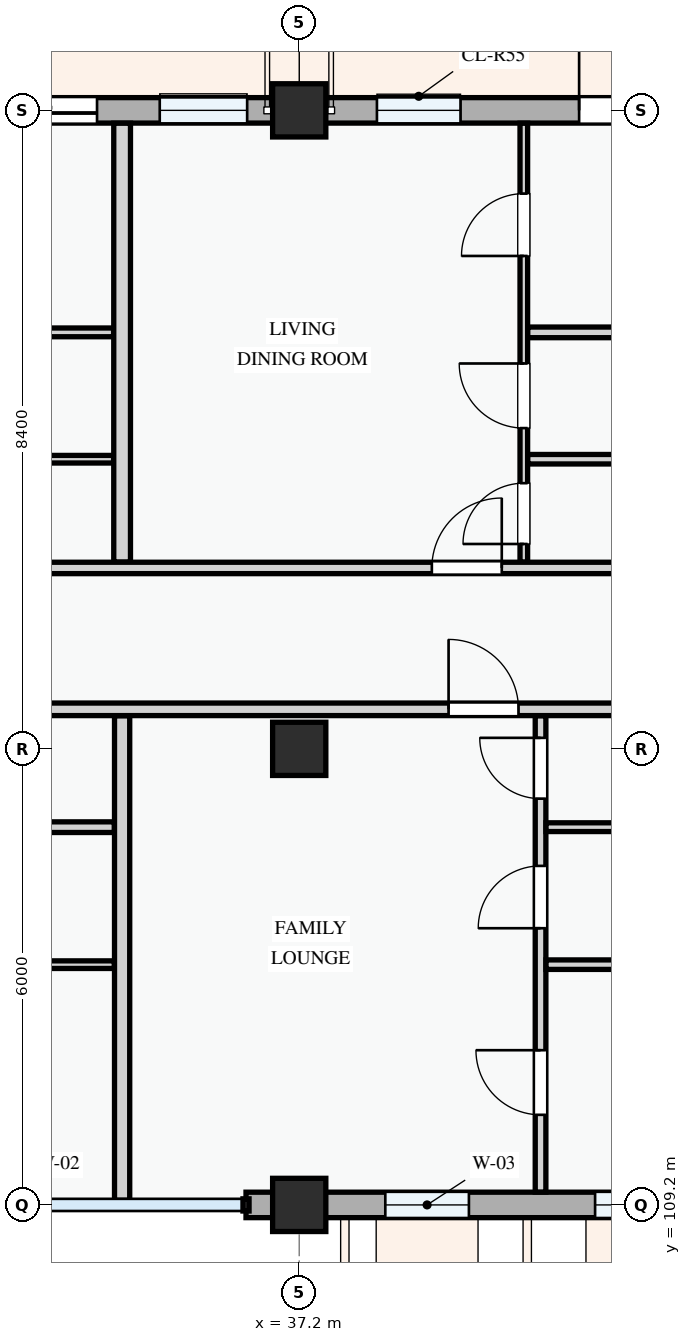
"""IFC4 building model, lengths in metres.
Left out: names, types, materials, properties, quantities, classifications, styles, units other than length and angle.
Written with IfcOpenShell. Run it as: python <this file> out.ifc"""

import sys

from ifc_helpers import new_model, si_unit, direction, frame, frame_2d, origin, origin_2d, place, context, subcontext, project, spatial, rectangle, extrude, element, fill, save


model = new_model("IFC4")
c1 = context("Model", 3, precision=1e-05, world=origin(), true_north=direction((0.0, 1.0)))
c2 = subcontext(c1, "Body", "Model", "MODEL_VIEW")
j1 = project(units=[si_unit("LENGTHUNIT", "METRE"), si_unit("PLANEANGLEUNIT", "RADIAN")], contexts=[c1])
p1 = place(None, origin())
s1 = spatial("IfcSite", under=j1, at=p1, CompositionType="ELEMENT")
p2 = place(p1, origin())
s2 = spatial("IfcBuilding", under=s1, at=p2, CompositionType="ELEMENT")
p3 = place(p2, frame((0.0, 0.0, 18.0)))
s3 = spatial("IfcBuildingStorey", under=s2, at=p3, CompositionType="ELEMENT", Elevation=18.0)
for number, where, z_axis, x_axis in (
    (1, (37.2, 109.2, 0.0), (0.0, 0.0, 1.0), (1.0, 0.0, 0.0)),
    (2, (37.2, 115.2, 0.0), (0.0, 0.0, 1.0), (1.0, 0.0, 0.0)),
    (3, (37.2, 123.6, 0.0), (0.0, 0.0, 1.0), (1.0, 0.0, 0.0)),
):
    element("IfcColumn", number, at=place(p3, frame(where, z_axis=z_axis, x_axis=x_axis)), inside=s3, PredefinedType="COLUMN", context=c2, shape_type="SweptSolid", body=[
        extrude(rectangle(XDim=0.7, YDim=0.7, at=origin_2d()), origin(), (0.0, 0.0, 1.0), 3.3),
    ])
p4 = place(p3, frame((36.5, 109.2, 0.0), z_axis=(0.0, 0.0, 1.0), x_axis=(1.0, 0.0, 0.0)))
e4 = element("IfcWall", 4, at=p4, inside=s3, PredefinedType="STANDARD", context=c2, shape_type="SweptSolid", body=[
    extrude(rectangle(XDim=0.7, YDim=0.335, at=frame_2d((0.35, 0.0))), origin(), (0.0, 0.0, 1.0), 2.375),
])
p5 = place(p3, frame((37.2, 109.2, 0.0), z_axis=(0.0, 0.0, 1.0), x_axis=(1.0, 0.0, 0.0)))
e5 = element("IfcWall", 5, at=p5, inside=s3, PredefinedType="STANDARD", context=c2, shape_type="SweptSolid", body=[
    extrude(rectangle(XDim=6.0, YDim=0.335, at=frame_2d((3.0, 0.0))), origin(), (0.0, 0.0, 1.0), 2.475),
])
p6 = place(p5, frame((1.133, 0.0, 0.78)))
e6 = element("IfcOpeningElement", 6, at=p6, cuts=e5, PredefinedType="OPENING", context=c2, shape_type="SweptSolid", body=[
    extrude(rectangle(XDim=1.1, YDim=1.3, at=frame_2d((0.55, 0.65))), frame((0.0, 0.177, 0.0), z_axis=(0.0, -1.0, 0.0), x_axis=(1.0, 0.0, 0.0)), (0.0, 0.0, 1.0), 0.355),
])
p7 = place(p5, frame((3.893, 0.0, 0.78)))
e7 = element("IfcOpeningElement", 7, at=p7, cuts=e5, PredefinedType="OPENING", context=c2, shape_type="SweptSolid", body=[
    extrude(rectangle(XDim=1.2, YDim=1.5, at=frame_2d((0.6, 0.75))), frame((0.0, 0.177, 0.0), z_axis=(0.0, -1.0, 0.0), x_axis=(1.0, 0.0, 0.0)), (0.0, 0.0, 1.0), 0.355),
])
p8 = place(p3, frame((43.2, 123.6, 0.0), z_axis=(0.0, 0.0, 1.0), x_axis=(-1.0, 0.0, 0.0)))
e8 = element("IfcWall", 8, at=p8, inside=s3, PredefinedType="STANDARD", context=c2, shape_type="SweptSolid", body=[
    extrude(rectangle(XDim=6.0, YDim=0.335, at=frame_2d((3.0, 0.0))), origin(), (0.0, 0.0, 1.0), 2.475),
])
p9 = place(p8, frame((1.018, 0.0, 0.0)))
e9 = element("IfcOpeningElement", 9, at=p9, cuts=e8, PredefinedType="OPENING", context=c2, shape_type="SweptSolid", body=[
    extrude(rectangle(XDim=1.3, YDim=2.15, at=frame_2d((0.65, 1.075))), frame((0.0, 0.177, 0.0), z_axis=(0.0, -1.0, 0.0), x_axis=(1.0, 0.0, 0.0)), (0.0, 0.0, 1.0), 0.355),
])
p10 = place(p8, frame((3.878, 0.0, 0.78)))
e10 = element("IfcOpeningElement", 10, at=p10, cuts=e8, PredefinedType="OPENING", context=c2, shape_type="SweptSolid", body=[
    extrude(rectangle(XDim=1.1, YDim=1.3, at=frame_2d((0.55, 0.65))), frame((0.0, 0.177, 0.0), z_axis=(0.0, -1.0, 0.0), x_axis=(1.0, 0.0, 0.0)), (0.0, 0.0, 1.0), 0.355),
])
p11 = place(p3, frame((37.2, 123.6, 0.0), z_axis=(0.0, 0.0, 1.0), x_axis=(-1.0, 0.0, 0.0)))
e11 = element("IfcWall", 11, at=p11, inside=s3, PredefinedType="STANDARD", context=c2, shape_type="SweptSolid", body=[
    extrude(rectangle(XDim=8.4, YDim=0.335, at=frame_2d((4.2, 0.0))), origin(), (0.0, 0.0, 1.0), 2.375),
])
p12 = place(p11, frame((2.66, 0.0, 0.0)))
e12 = element("IfcOpeningElement", 12, at=p12, cuts=e11, PredefinedType="OPENING", context=c2, shape_type="SweptSolid", body=[
    extrude(rectangle(XDim=1.4, YDim=2.2, at=frame_2d((0.7, 1.1))), frame((0.0, 0.177, 0.0), z_axis=(0.0, -1.0, 0.0), x_axis=(1.0, 0.0, 0.0)), (0.0, 0.0, 1.0), 0.355),
])
p13 = place(p11, frame((0.685, 0.0, 0.78)))
e13 = element("IfcOpeningElement", 13, at=p13, cuts=e11, PredefinedType="OPENING", context=c2, shape_type="SweptSolid", body=[
    extrude(rectangle(XDim=1.15, YDim=1.25, at=frame_2d((0.575, 0.625))), frame((0.0, 0.177, 0.0), z_axis=(0.0, -1.0, 0.0), x_axis=(1.0, 0.0, 0.0)), (0.0, 0.0, 1.0), 0.355),
])
p14 = place(p11, frame((4.697, 0.0, 0.78)))
e14 = element("IfcOpeningElement", 14, at=p14, cuts=e11, PredefinedType="OPENING", context=c2, shape_type="SweptSolid", body=[
    extrude(rectangle(XDim=1.3, YDim=1.4, at=frame_2d((0.65, 0.7))), frame((0.0, 0.177, 0.0), z_axis=(0.0, -1.0, 0.0), x_axis=(1.0, 0.0, 0.0)), (0.0, 0.0, 1.0), 0.355),
])
p15 = place(p11, frame((6.947, 0.0, 0.78)))
e15 = element("IfcOpeningElement", 15, at=p15, cuts=e11, PredefinedType="OPENING", context=c2, shape_type="SweptSolid", body=[
    extrude(rectangle(XDim=0.9, YDim=1.2, at=frame_2d((0.45, 0.6))), frame((0.0, 0.177, 0.0), z_axis=(0.0, -1.0, 0.0), x_axis=(1.0, 0.0, 0.0)), (0.0, 0.0, 1.0), 0.355),
])
p16 = place(p3, frame((30.669, 112.361, 0.0), z_axis=(0.0, 0.0, 1.0), x_axis=(1.0, 0.0, 0.0)))
e16 = element("IfcWall", 16, at=p16, inside=s3, PredefinedType="PARTITIONING", context=c2, shape_type="SweptSolid", body=[
    extrude(rectangle(XDim=4.099, YDim=0.1, at=frame_2d((2.049, 0.0))), origin(), (0.0, 0.0, 1.0), 3.0),
])
p17 = place(p3, frame((30.669, 114.17, 0.0), z_axis=(0.0, 0.0, 1.0), x_axis=(1.0, 0.0, 0.0)))
e17 = element("IfcWall", 17, at=p17, inside=s3, PredefinedType="PARTITIONING", context=c2, shape_type="SweptSolid", body=[
    extrude(rectangle(XDim=4.099, YDim=0.14, at=frame_2d((2.049, 0.0))), origin(), (0.0, 0.0, 1.0), 3.0),
])
p18 = place(p3, frame((30.68, 120.679, 0.0), z_axis=(0.0, 0.0, 1.0), x_axis=(1.0, 0.0, 0.0)))
e18 = element("IfcWall", 18, at=p18, inside=s3, PredefinedType="PARTITIONING", context=c2, shape_type="SweptSolid", body=[
    extrude(rectangle(XDim=4.078, YDim=0.115, at=frame_2d((2.039, 0.0))), origin(), (0.0, 0.0, 1.0), 3.0),
])
p19 = place(p3, frame((30.68, 119.01, 0.0), z_axis=(0.0, 0.0, 1.0), x_axis=(1.0, 0.0, 0.0)))
e19 = element("IfcWall", 19, at=p19, inside=s3, PredefinedType="PARTITIONING", context=c2, shape_type="SweptSolid", body=[
    extrude(rectangle(XDim=4.078, YDim=0.1, at=frame_2d((2.039, 0.0))), origin(), (0.0, 0.0, 1.0), 3.0),
])
p20 = place(p3, frame((40.375, 109.369, 0.0), z_axis=(0.0, 0.0, 1.0), x_axis=(0.0, 1.0, 0.0)))
e20 = element("IfcWall", 20, at=p20, inside=s3, PredefinedType="PARTITIONING", context=c2, shape_type="SweptSolid", body=[
    extrude(rectangle(XDim=6.266, YDim=0.14, at=frame_2d((3.133, 0.0))), origin(), (0.0, 0.0, 1.0), 3.0),
])
p21 = place(p20, frame((1.016, 0.0, 0.0)))
e21 = element("IfcOpeningElement", 21, at=p21, cuts=e20, PredefinedType="OPENING", context=c2, shape_type="SweptSolid", body=[
    extrude(rectangle(XDim=0.85, YDim=2.1, at=frame_2d((0.425, 1.05))), frame((0.0, 0.08, 0.0), z_axis=(0.0, -1.0, 0.0), x_axis=(1.0, 0.0, 0.0)), (0.0, 0.0, 1.0), 0.16),
])
p22 = place(p20, frame((3.471, 0.0, 0.0)))
e22 = element("IfcOpeningElement", 22, at=p22, cuts=e20, PredefinedType="OPENING", context=c2, shape_type="SweptSolid", body=[
    extrude(rectangle(XDim=0.82, YDim=2.08, at=frame_2d((0.41, 1.04))), frame((0.0, 0.08, 0.0), z_axis=(0.0, -1.0, 0.0), x_axis=(1.0, 0.0, 0.0)), (0.0, 0.0, 1.0), 0.16),
])
p23 = place(p20, frame((5.175, 0.0, 0.0)))
e23 = element("IfcOpeningElement", 23, at=p23, cuts=e20, PredefinedType="OPENING", context=c2, shape_type="SweptSolid", body=[
    extrude(rectangle(XDim=0.8, YDim=2.1, at=frame_2d((0.4, 1.05))), frame((0.0, 0.08, 0.0), z_axis=(0.0, -1.0, 0.0), x_axis=(1.0, 0.0, 0.0)), (0.0, 0.0, 1.0), 0.16),
])
p24 = place(p3, frame((40.447, 112.361, 0.0), z_axis=(0.0, 0.0, 1.0), x_axis=(1.0, 0.0, 0.0)))
e24 = element("IfcWall", 24, at=p24, inside=s3, PredefinedType="PARTITIONING", context=c2, shape_type="SweptSolid", body=[
    extrude(rectangle(XDim=5.338, YDim=0.125, at=frame_2d((2.669, 0.0))), origin(), (0.0, 0.0, 1.0), 3.0),
])
p25 = place(p3, frame((40.447, 114.17, 0.0), z_axis=(0.0, 0.0, 1.0), x_axis=(1.0, 0.0, 0.0)))
e25 = element("IfcWall", 25, at=p25, inside=s3, PredefinedType="PARTITIONING", context=c2, shape_type="SweptSolid", body=[
    extrude(rectangle(XDim=5.338, YDim=0.115, at=frame_2d((2.669, 0.0))), origin(), (0.0, 0.0, 1.0), 3.0),
])
p26 = place(p3, frame((40.155, 117.657, 0.0), z_axis=(0.0, 0.0, 1.0), x_axis=(0.0, 1.0, 0.0)))
e26 = element("IfcWall", 26, at=p26, inside=s3, PredefinedType="PARTITIONING", context=c2, shape_type="SweptSolid", body=[
    extrude(rectangle(XDim=5.773, YDim=0.1, at=frame_2d((2.887, 0.0))), origin(), (0.0, 0.0, 1.0), 3.0),
])
p27 = place(p26, frame((0.238, 0.0, 0.0)))
e27 = element("IfcOpeningElement", 27, at=p27, cuts=e26, PredefinedType="OPENING", context=c2, shape_type="SweptSolid", body=[
    extrude(rectangle(XDim=0.8, YDim=2.1, at=frame_2d((0.4, 1.05))), frame((0.0, 0.06, 0.0), z_axis=(0.0, -1.0, 0.0), x_axis=(1.0, 0.0, 0.0)), (0.0, 0.0, 1.0), 0.12),
])
p28 = place(p26, frame((1.763, 0.0, 0.0)))
e28 = element("IfcOpeningElement", 28, at=p28, cuts=e26, PredefinedType="OPENING", context=c2, shape_type="SweptSolid", body=[
    extrude(rectangle(XDim=0.85, YDim=2.1, at=frame_2d((0.425, 1.05))), frame((0.0, 0.06, 0.0), z_axis=(0.0, -1.0, 0.0), x_axis=(1.0, 0.0, 0.0)), (0.0, 0.0, 1.0), 0.12),
])
p29 = place(p26, frame((4.028, 0.0, 0.0)))
e29 = element("IfcOpeningElement", 29, at=p29, cuts=e26, PredefinedType="OPENING", context=c2, shape_type="SweptSolid", body=[
    extrude(rectangle(XDim=0.82, YDim=2.08, at=frame_2d((0.41, 1.04))), frame((0.0, 0.06, 0.0), z_axis=(0.0, -1.0, 0.0), x_axis=(1.0, 0.0, 0.0)), (0.0, 0.0, 1.0), 0.12),
])
p30 = place(p3, frame((40.207, 120.679, 0.0), z_axis=(0.0, 0.0, 1.0), x_axis=(1.0, 0.0, 0.0)))
e30 = element("IfcWall", 30, at=p30, inside=s3, PredefinedType="PARTITIONING", context=c2, shape_type="SweptSolid", body=[
    extrude(rectangle(XDim=5.571, YDim=0.14, at=frame_2d((2.786, 0.0))), origin(), (0.0, 0.0, 1.0), 3.0),
])
p31 = place(p3, frame((40.207, 119.01, 0.0), z_axis=(0.0, 0.0, 1.0), x_axis=(1.0, 0.0, 0.0)))
e31 = element("IfcWall", 31, at=p31, inside=s3, PredefinedType="PARTITIONING", context=c2, shape_type="SweptSolid", body=[
    extrude(rectangle(XDim=5.571, YDim=0.125, at=frame_2d((2.786, 0.0))), origin(), (0.0, 0.0, 1.0), 3.0),
])
p32 = place(p3, frame((34.87, 109.26, 0.0), z_axis=(0.0, 0.0, 1.0), x_axis=(0.0, 1.0, 0.0)))
e32 = element("IfcWall", 32, at=p32, inside=s3, PredefinedType="PARTITIONING", context=c2, shape_type="SweptSolid", body=[
    extrude(rectangle(XDim=6.375, YDim=0.2, at=frame_2d((3.188, 0.0))), origin(), (0.0, 0.0, 1.0), 3.0),
])
p33 = place(p3, frame((34.87, 117.657, 0.0), z_axis=(0.0, 0.0, 1.0), x_axis=(0.0, 1.0, 0.0)))
e33 = element("IfcWall", 33, at=p33, inside=s3, PredefinedType="PARTITIONING", context=c2, shape_type="SweptSolid", body=[
    extrude(rectangle(XDim=5.773, YDim=0.22, at=frame_2d((2.887, 0.0))), origin(), (0.0, 0.0, 1.0), 3.0),
])
p34 = place(p3, frame((25.15, 115.72, 0.0), z_axis=(0.0, 0.0, 1.0), x_axis=(1.0, 0.0, 0.0)))
e34 = element("IfcWall", 34, at=p34, inside=s3, PredefinedType="PARTITIONING", context=c2, shape_type="SweptSolid", body=[
    extrude(rectangle(XDim=32.281, YDim=0.165, at=frame_2d((16.14, 0.0))), origin(), (0.0, 0.0, 1.0), 3.0),
])
p35 = place(p34, frame((0.25, 0.0, 0.0)))
e35 = element("IfcOpeningElement", 35, at=p35, cuts=e34, PredefinedType="OPENING", context=c2, shape_type="SweptSolid", body=[
    extrude(rectangle(XDim=0.96, YDim=2.12, at=frame_2d((0.48, 1.06))), frame((0.0, 0.093, 0.0), z_axis=(0.0, -1.0, 0.0), x_axis=(1.0, 0.0, 0.0)), (0.0, 0.0, 1.0), 0.185),
])
p36 = place(p34, frame((14.015, 0.0, 0.0)))
e36 = element("IfcOpeningElement", 36, at=p36, cuts=e34, PredefinedType="OPENING", context=c2, shape_type="SweptSolid", body=[
    extrude(rectangle(XDim=0.92, YDim=2.1, at=frame_2d((0.46, 1.05))), frame((0.0, 0.093, 0.0), z_axis=(0.0, -1.0, 0.0), x_axis=(1.0, 0.0, 0.0)), (0.0, 0.0, 1.0), 0.185),
])
p37 = place(p34, frame((21.739, 0.0, 0.0)))
e37 = element("IfcOpeningElement", 37, at=p37, cuts=e34, PredefinedType="OPENING", context=c2, shape_type="SweptSolid", body=[
    extrude(rectangle(XDim=0.92, YDim=2.1, at=frame_2d((0.46, 1.05))), frame((0.0, 0.093, 0.0), z_axis=(0.0, -1.0, 0.0), x_axis=(1.0, 0.0, 0.0)), (0.0, 0.0, 1.0), 0.185),
])
p38 = place(p3, frame((22.66, 117.58, 0.0), z_axis=(0.0, 0.0, 1.0), x_axis=(1.0, 0.0, 0.0)))
e38 = element("IfcWall", 38, at=p38, inside=s3, PredefinedType="PARTITIONING", context=c2, shape_type="SweptSolid", body=[
    extrude(rectangle(XDim=34.88, YDim=0.15, at=frame_2d((17.44, 0.0))), origin(), (0.0, 0.0, 1.0), 3.0),
])
p39 = place(p38, frame((2.74, 0.0, 0.0)))
e39 = element("IfcOpeningElement", 39, at=p39, cuts=e38, PredefinedType="OPENING", context=c2, shape_type="SweptSolid", body=[
    extrude(rectangle(XDim=0.92, YDim=2.1, at=frame_2d((0.46, 1.05))), frame((0.0, 0.085, 0.0), z_axis=(0.0, -1.0, 0.0), x_axis=(1.0, 0.0, 0.0)), (0.0, 0.0, 1.0), 0.17),
])
p40 = place(p38, frame((16.285, 0.0, 0.0)))
e40 = element("IfcOpeningElement", 40, at=p40, cuts=e38, PredefinedType="OPENING", context=c2, shape_type="SweptSolid", body=[
    extrude(rectangle(XDim=0.92, YDim=2.1, at=frame_2d((0.46, 1.05))), frame((0.0, 0.085, 0.0), z_axis=(0.0, -1.0, 0.0), x_axis=(1.0, 0.0, 0.0)), (0.0, 0.0, 1.0), 0.17),
])
p41 = place(p38, frame((24.263, 0.0, 0.0)))
e41 = element("IfcOpeningElement", 41, at=p41, cuts=e38, PredefinedType="OPENING", context=c2, shape_type="SweptSolid", body=[
    extrude(rectangle(XDim=0.96, YDim=2.12, at=frame_2d((0.48, 1.06))), frame((0.0, 0.085, 0.0), z_axis=(0.0, -1.0, 0.0), x_axis=(1.0, 0.0, 0.0)), (0.0, 0.0, 1.0), 0.17),
])
p42 = place(p6, origin())
e42 = element("IfcWindow", 42, at=p42, inside=s3, PartitioningType="SINGLE_PANEL", PredefinedType="WINDOW", context=c2, shape_type="SweptSolid", body=[
    extrude(rectangle(XDim=1.1, YDim=1.3, at=frame_2d((0.55, 0.65))), frame((0.0, 0.03, 0.0), z_axis=(0.0, -1.0, 0.0), x_axis=(1.0, 0.0, 0.0)), (0.0, 0.0, 1.0), 0.06),
])
fill(e6, e42)
p43 = place(p7, origin())
e43 = element("IfcWindow", 43, at=p43, inside=s3, PartitioningType="SINGLE_PANEL", PredefinedType="WINDOW", context=c2, shape_type="SweptSolid", body=[
    extrude(rectangle(XDim=1.2, YDim=1.5, at=frame_2d((0.6, 0.75))), frame((0.0, 0.03, 0.0), z_axis=(0.0, -1.0, 0.0), x_axis=(1.0, 0.0, 0.0)), (0.0, 0.0, 1.0), 0.06),
])
fill(e7, e43)
p44 = place(p9, frame((1.3, 0.0, 0.0), z_axis=(0.0, 0.0, 1.0), x_axis=(-1.0, 0.0, 0.0)))
e44 = element("IfcDoor", 44, at=p44, inside=s3, OperationType="SINGLE_SWING_LEFT", PredefinedType="DOOR", context=c2, shape_type="SweptSolid", body=[
    extrude(rectangle(XDim=1.3, YDim=2.15, at=frame_2d((0.65, 1.075))), frame((0.0, 0.025, 0.0), z_axis=(0.0, -1.0, 0.0), x_axis=(1.0, 0.0, 0.0)), (0.0, 0.0, 1.0), 0.05),
])
fill(e9, e44)
p45 = place(p10, origin())
e45 = element("IfcWindow", 45, at=p45, inside=s3, PartitioningType="SINGLE_PANEL", PredefinedType="WINDOW", context=c2, shape_type="SweptSolid", body=[
    extrude(rectangle(XDim=1.1, YDim=1.3, at=frame_2d((0.55, 0.65))), frame((0.0, 0.03, 0.0), z_axis=(0.0, -1.0, 0.0), x_axis=(1.0, 0.0, 0.0)), (0.0, 0.0, 1.0), 0.06),
])
fill(e10, e45)
p46 = place(p12, frame((1.4, 0.0, 0.0), z_axis=(0.0, 0.0, 1.0), x_axis=(-1.0, 0.0, 0.0)))
e46 = element("IfcDoor", 46, at=p46, inside=s3, OperationType="SLIDING_TO_LEFT", PredefinedType="DOOR", context=c2, shape_type="SweptSolid", body=[
    extrude(rectangle(XDim=1.4, YDim=2.2, at=frame_2d((0.7, 1.1))), frame((0.0, 0.025, 0.0), z_axis=(0.0, -1.0, 0.0), x_axis=(1.0, 0.0, 0.0)), (0.0, 0.0, 1.0), 0.05),
])
fill(e12, e46)
p47 = place(p13, origin())
e47 = element("IfcWindow", 47, at=p47, inside=s3, PartitioningType="SINGLE_PANEL", PredefinedType="WINDOW", context=c2, shape_type="SweptSolid", body=[
    extrude(rectangle(XDim=1.15, YDim=1.25, at=frame_2d((0.575, 0.625))), frame((0.0, 0.03, 0.0), z_axis=(0.0, -1.0, 0.0), x_axis=(1.0, 0.0, 0.0)), (0.0, 0.0, 1.0), 0.06),
])
fill(e13, e47)
p48 = place(p21, origin())
e48 = element("IfcDoor", 48, at=p48, inside=s3, OperationType="SINGLE_SWING_RIGHT", PredefinedType="DOOR", context=c2, shape_type="SweptSolid", body=[
    extrude(rectangle(XDim=0.85, YDim=2.1, at=frame_2d((0.425, 1.05))), frame((0.0, 0.025, 0.0), z_axis=(0.0, -1.0, 0.0), x_axis=(1.0, 0.0, 0.0)), (0.0, 0.0, 1.0), 0.05),
])
fill(e21, e48)
p49 = place(p22, origin())
e49 = element("IfcDoor", 49, at=p49, inside=s3, OperationType="SINGLE_SWING_LEFT", PredefinedType="DOOR", context=c2, shape_type="SweptSolid", body=[
    extrude(rectangle(XDim=0.82, YDim=2.08, at=frame_2d((0.41, 1.04))), frame((0.0, 0.025, 0.0), z_axis=(0.0, -1.0, 0.0), x_axis=(1.0, 0.0, 0.0)), (0.0, 0.0, 1.0), 0.05),
])
fill(e22, e49)
p50 = place(p23, origin())
e50 = element("IfcDoor", 50, at=p50, inside=s3, OperationType="SINGLE_SWING_RIGHT", PredefinedType="DOOR", context=c2, shape_type="SweptSolid", body=[
    extrude(rectangle(XDim=0.8, YDim=2.1, at=frame_2d((0.4, 1.05))), frame((0.0, 0.025, 0.0), z_axis=(0.0, -1.0, 0.0), x_axis=(1.0, 0.0, 0.0)), (0.0, 0.0, 1.0), 0.05),
])
fill(e23, e50)
p51 = place(p27, origin())
e51 = element("IfcDoor", 51, at=p51, inside=s3, OperationType="SINGLE_SWING_LEFT", PredefinedType="DOOR", context=c2, shape_type="SweptSolid", body=[
    extrude(rectangle(XDim=0.8, YDim=2.1, at=frame_2d((0.4, 1.05))), frame((0.0, 0.025, 0.0), z_axis=(0.0, -1.0, 0.0), x_axis=(1.0, 0.0, 0.0)), (0.0, 0.0, 1.0), 0.05),
])
fill(e27, e51)
p52 = place(p28, origin())
e52 = element("IfcDoor", 52, at=p52, inside=s3, OperationType="SINGLE_SWING_RIGHT", PredefinedType="DOOR", context=c2, shape_type="SweptSolid", body=[
    extrude(rectangle(XDim=0.85, YDim=2.1, at=frame_2d((0.425, 1.05))), frame((0.0, 0.025, 0.0), z_axis=(0.0, -1.0, 0.0), x_axis=(1.0, 0.0, 0.0)), (0.0, 0.0, 1.0), 0.05),
])
fill(e28, e52)
p53 = place(p29, origin())
e53 = element("IfcDoor", 53, at=p53, inside=s3, OperationType="SINGLE_SWING_LEFT", PredefinedType="DOOR", context=c2, shape_type="SweptSolid", body=[
    extrude(rectangle(XDim=0.82, YDim=2.08, at=frame_2d((0.41, 1.04))), frame((0.0, 0.025, 0.0), z_axis=(0.0, -1.0, 0.0), x_axis=(1.0, 0.0, 0.0)), (0.0, 0.0, 1.0), 0.05),
])
fill(e29, e53)
p54 = place(p36, origin())
e54 = element("IfcDoor", 54, at=p54, inside=s3, OperationType="SINGLE_SWING_LEFT", PredefinedType="DOOR", context=c2, shape_type="SweptSolid", body=[
    extrude(rectangle(XDim=0.92, YDim=2.1, at=frame_2d((0.46, 1.05))), frame((0.0, 0.025, 0.0), z_axis=(0.0, -1.0, 0.0), x_axis=(1.0, 0.0, 0.0)), (0.0, 0.0, 1.0), 0.05),
])
fill(e36, e54)
p55 = place(p40, origin())
e55 = element("IfcDoor", 55, at=p55, inside=s3, OperationType="SINGLE_SWING_RIGHT", PredefinedType="DOOR", context=c2, shape_type="SweptSolid", body=[
    extrude(rectangle(XDim=0.92, YDim=2.1, at=frame_2d((0.46, 1.05))), frame((0.0, 0.025, 0.0), z_axis=(0.0, -1.0, 0.0), x_axis=(1.0, 0.0, 0.0)), (0.0, 0.0, 1.0), 0.05),
])
fill(e40, e55)
save(model, sys.argv[1])
